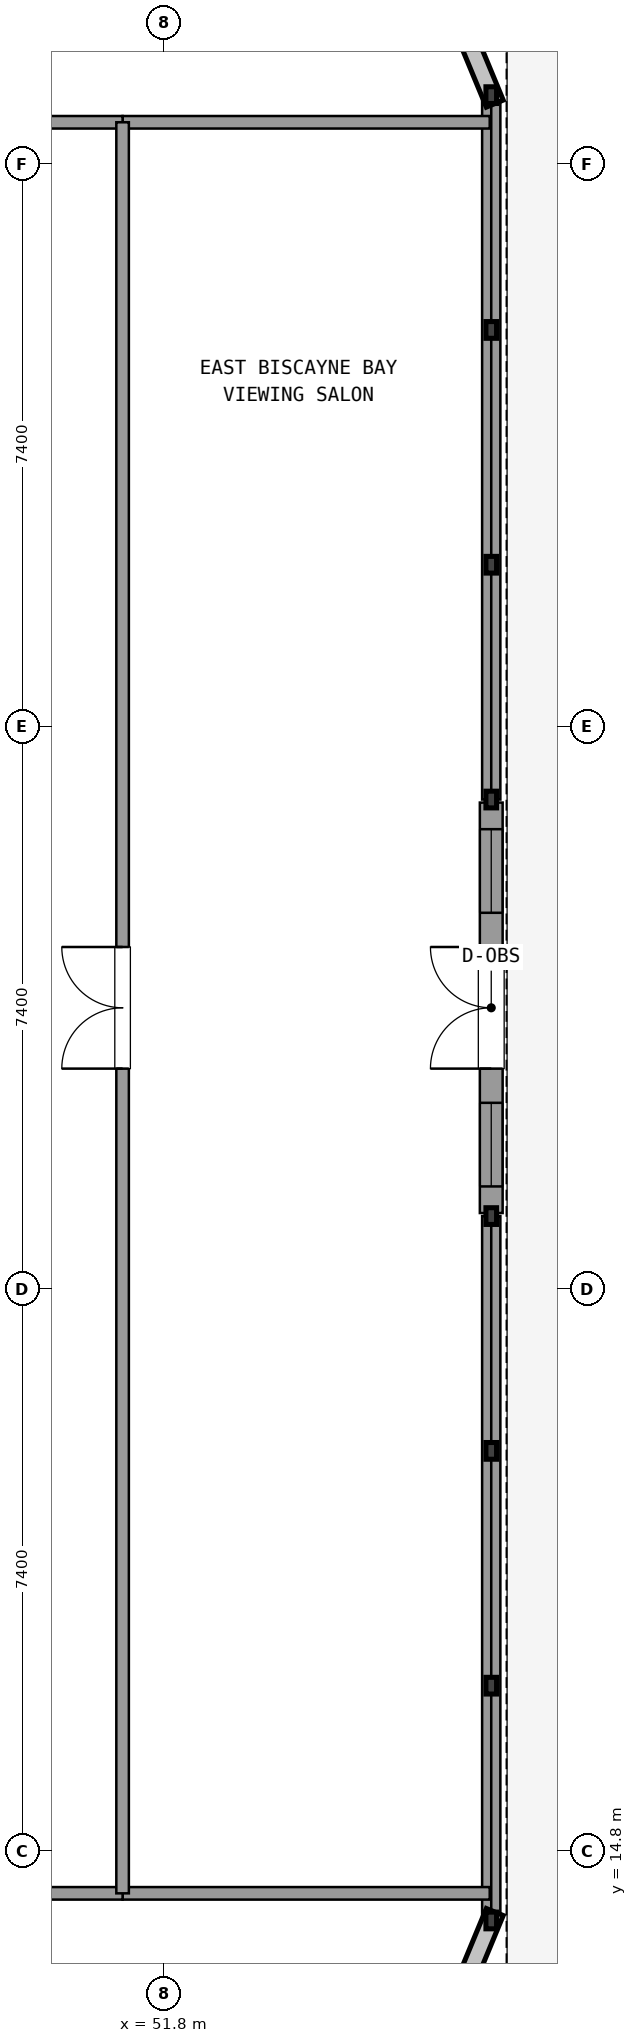
"""IFC4 building model, lengths in metres.
Left out: names, types, materials, properties, quantities, classifications, styles, units other than length and angle.
Written with IfcOpenShell. Run it as: python <this file> out.ifc"""

import sys

from ifc_helpers import new_model, si_unit, direction, frame, frame_2d, origin, place, context, subcontext, project, spatial, rectangle, extrude, element, fill, save


model = new_model("IFC4")
c1 = context("Model", 3, precision=1e-05, world=origin(), true_north=direction((0.0, 1.0)))
c2 = subcontext(c1, "Body", "Model", "MODEL_VIEW")
j1 = project(units=[si_unit("LENGTHUNIT", "METRE"), si_unit("PLANEANGLEUNIT", "RADIAN")], contexts=[c1])
p1 = place(None, origin())
s1 = spatial("IfcSite", under=j1, at=p1, CompositionType="ELEMENT")
p2 = place(p1, origin())
s2 = spatial("IfcBuilding", under=s1, at=p2, CompositionType="ELEMENT")
p3 = place(p2, frame((0.0, 0.0, 294.66)))
s3 = spatial("IfcBuildingStorey", under=s2, at=p3, CompositionType="ELEMENT", Elevation=294.66)
p4 = place(p3, frame((56.1, 23.2, 0.0), z_axis=(0.0, 0.0, 1.0), x_axis=(0.0, 1.0, 0.0)))
e1 = element("IfcWall", 1, at=p4, inside=s3, PredefinedType="SOLIDWALL", context=c2, shape_type="SweptSolid", body=[
    extrude(rectangle(XDim=5.4, YDim=0.3, at=frame_2d((2.7, 0.0))), origin(), (0.0, 0.0, 1.0), 3.46),
])
p5 = place(p4, frame((1.9, 0.0, 0.0)))
e2 = element("IfcOpeningElement", 2, at=p5, cuts=e1, PredefinedType="OPENING", context=c2, shape_type="SweptSolid", body=[
    extrude(rectangle(XDim=1.6, YDim=2.2, at=frame_2d((0.8, 1.1))), frame((0.0, 0.16, 0.0), z_axis=(0.0, -1.0, 0.0), x_axis=(1.0, 0.0, 0.0)), (0.0, 0.0, 1.0), 0.32),
])
p6 = place(p4, frame((0.35, 0.0, 0.4)))
e3 = element("IfcOpeningElement", 3, at=p6, cuts=e1, PredefinedType="OPENING", context=c2, shape_type="SweptSolid", body=[
    extrude(rectangle(XDim=1.1, YDim=1.8, at=frame_2d((0.55, 0.9))), frame((0.0, 0.16, 0.0), z_axis=(0.0, -1.0, 0.0), x_axis=(1.0, 0.0, 0.0)), (0.0, 0.0, 1.0), 0.32),
])
p7 = place(p4, frame((3.95, 0.0, 0.4)))
e4 = element("IfcOpeningElement", 4, at=p7, cuts=e1, PredefinedType="OPENING", context=c2, shape_type="SweptSolid", body=[
    extrude(rectangle(XDim=1.1, YDim=1.8, at=frame_2d((0.55, 0.9))), frame((0.0, 0.16, 0.0), z_axis=(0.0, -1.0, 0.0), x_axis=(1.0, 0.0, 0.0)), (0.0, 0.0, 1.0), 0.32),
])
p8 = place(p3, frame((56.1, 13.893, 0.0), z_axis=(0.0, 0.0, 1.0), x_axis=(0.0, 1.0, 0.0)))
e5 = element("IfcWall", 5, at=p8, inside=s3, PredefinedType="SOLIDWALL", context=c2, shape_type="SweptSolid", body=[
    extrude(rectangle(XDim=9.267, YDim=0.24, at=frame_2d((4.633, 0.0))), origin(), (0.0, 0.0, 1.0), 0.85),
])
p9 = place(p3, frame((56.1, 28.64, 0.0), z_axis=(0.0, 0.0, 1.0), x_axis=(0.0, 1.0, 0.0)))
e6 = element("IfcWall", 6, at=p9, inside=s3, PredefinedType="SOLIDWALL", context=c2, shape_type="SweptSolid", body=[
    extrude(rectangle(XDim=9.267, YDim=0.24, at=frame_2d((4.634, 0.0))), origin(), (0.0, 0.0, 1.0), 0.85),
])
for number, where, z_axis, x_axis in (
    (7, (51.25, 37.55, 0.0), (0.0, 0.0, 1.0), (1.0, 0.0, 0.0)),
    (8, (51.25, 14.25, 0.0), (0.0, 0.0, 1.0), (1.0, 0.0, 0.0)),
):
    element("IfcWall", number, at=place(p3, frame(where, z_axis=z_axis, x_axis=x_axis)), inside=s3, PredefinedType="PARTITIONING", context=c2, shape_type="SweptSolid", body=[
        extrude(rectangle(XDim=4.83, YDim=0.165, at=frame_2d((2.415, 0.0))), origin(), (0.0, 0.0, 1.0), 3.31),
    ])
p10 = place(p3, frame((44.212, 37.55, 0.0), z_axis=(0.0, 0.0, 1.0), x_axis=(1.0, 0.0, 0.0)))
e9 = element("IfcWall", 9, at=p10, inside=s3, PredefinedType="PARTITIONING", context=c2, shape_type="SweptSolid", body=[
    extrude(rectangle(XDim=7.038, YDim=0.165, at=frame_2d((3.519, 0.0))), origin(), (0.0, 0.0, 1.0), 3.31),
])
p11 = place(p10, frame((2.719, 0.0, 0.0)))
e10 = element("IfcOpeningElement", 10, at=p11, cuts=e9, PredefinedType="OPENING", context=c2, shape_type="SweptSolid", body=[
    extrude(rectangle(XDim=1.6, YDim=2.2, at=frame_2d((0.8, 1.1))), frame((0.0, 0.093, 0.0), z_axis=(0.0, -1.0, 0.0), x_axis=(1.0, 0.0, 0.0)), (0.0, 0.0, 1.0), 0.185),
])
p12 = place(p3, frame((44.212, 14.25, 0.0), z_axis=(0.0, 0.0, 1.0), x_axis=(1.0, 0.0, 0.0)))
e11 = element("IfcWall", 11, at=p12, inside=s3, PredefinedType="PARTITIONING", context=c2, shape_type="SweptSolid", body=[
    extrude(rectangle(XDim=7.038, YDim=0.165, at=frame_2d((3.519, 0.0))), origin(), (0.0, 0.0, 1.0), 3.31),
])
p13 = place(p12, frame((2.719, 0.0, 0.0)))
e12 = element("IfcOpeningElement", 12, at=p13, cuts=e11, PredefinedType="OPENING", context=c2, shape_type="SweptSolid", body=[
    extrude(rectangle(XDim=1.6, YDim=2.2, at=frame_2d((0.8, 1.1))), frame((0.0, 0.093, 0.0), z_axis=(0.0, -1.0, 0.0), x_axis=(1.0, 0.0, 0.0)), (0.0, 0.0, 1.0), 0.185),
])
p14 = place(p3, frame((51.25, 14.25, 0.0), z_axis=(0.0, 0.0, 1.0), x_axis=(0.0, 1.0, 0.0)))
e13 = element("IfcWall", 13, at=p14, inside=s3, PredefinedType="PARTITIONING", context=c2, shape_type="SweptSolid", body=[
    extrude(rectangle(XDim=23.3, YDim=0.165, at=frame_2d((11.65, 0.0))), origin(), (0.0, 0.0, 1.0), 3.31),
])
p15 = place(p14, frame((10.85, 0.0, 0.0)))
e14 = element("IfcOpeningElement", 14, at=p15, cuts=e13, PredefinedType="OPENING", context=c2, shape_type="SweptSolid", body=[
    extrude(rectangle(XDim=1.6, YDim=2.2, at=frame_2d((0.8, 1.1))), frame((0.0, 0.093, 0.0), z_axis=(0.0, -1.0, 0.0), x_axis=(1.0, 0.0, 0.0)), (0.0, 0.0, 1.0), 0.185),
])
p16 = place(p5, origin())
e15 = element("IfcDoor", 15, at=p16, inside=s3, OperationType="DOUBLE_DOOR_SINGLE_SWING", PredefinedType="DOOR", context=c2, shape_type="SweptSolid", body=[
    extrude(rectangle(XDim=1.6, YDim=2.2, at=frame_2d((0.8, 1.1))), frame((0.0, 0.025, 0.0), z_axis=(0.0, -1.0, 0.0), x_axis=(1.0, 0.0, 0.0)), (0.0, 0.0, 1.0), 0.05),
])
fill(e2, e15)
p17 = place(p6, origin())
e16 = element("IfcWindow", 16, at=p17, inside=s3, PartitioningType="SINGLE_PANEL", PredefinedType="WINDOW", context=c2, shape_type="SweptSolid", body=[
    extrude(rectangle(XDim=1.1, YDim=1.8, at=frame_2d((0.55, 0.9))), frame((0.0, 0.03, 0.0), z_axis=(0.0, -1.0, 0.0), x_axis=(1.0, 0.0, 0.0)), (0.0, 0.0, 1.0), 0.06),
])
fill(e3, e16)
p18 = place(p7, origin())
e17 = element("IfcWindow", 17, at=p18, inside=s3, PartitioningType="SINGLE_PANEL", PredefinedType="WINDOW", context=c2, shape_type="SweptSolid", body=[
    extrude(rectangle(XDim=1.1, YDim=1.8, at=frame_2d((0.55, 0.9))), frame((0.0, 0.03, 0.0), z_axis=(0.0, -1.0, 0.0), x_axis=(1.0, 0.0, 0.0)), (0.0, 0.0, 1.0), 0.06),
])
fill(e4, e17)
p19 = place(p15, origin())
e18 = element("IfcDoor", 18, at=p19, inside=s3, OperationType="DOUBLE_DOOR_SINGLE_SWING", PredefinedType="DOOR", context=c2, shape_type="SweptSolid", body=[
    extrude(rectangle(XDim=1.6, YDim=2.2, at=frame_2d((0.8, 1.1))), frame((0.0, 0.025, 0.0), z_axis=(0.0, -1.0, 0.0), x_axis=(1.0, 0.0, 0.0)), (0.0, 0.0, 1.0), 0.05),
])
fill(e14, e18)
save(model, sys.argv[1])
